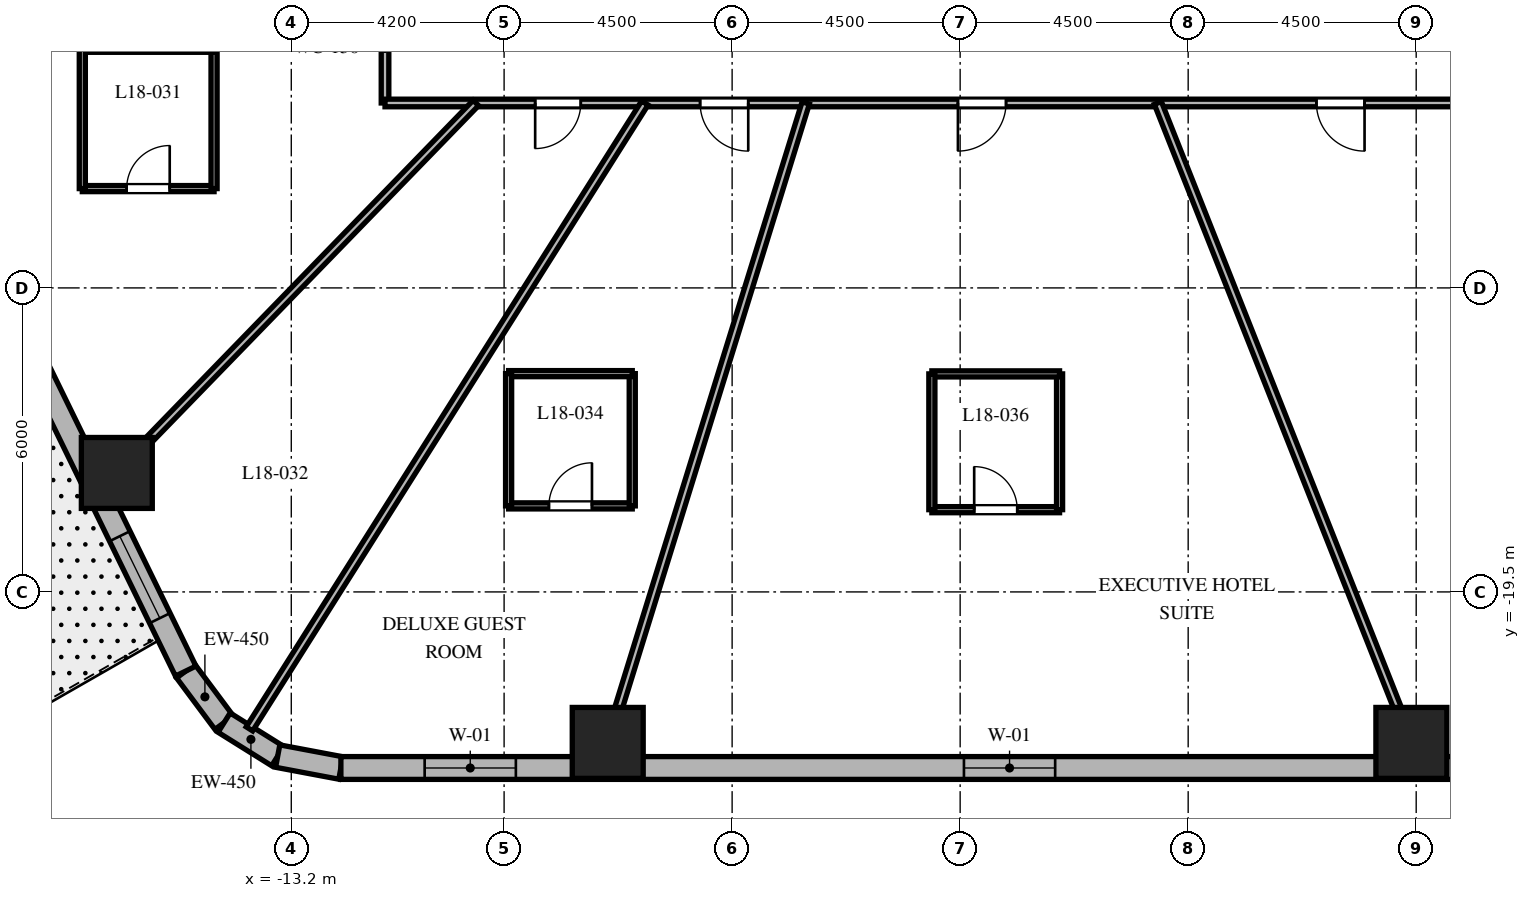
"""IFC4 building model, lengths in metres.
Left out: names, types, materials, properties, quantities, classifications, styles, units other than length and angle.
Written with IfcOpenShell. Run it as: python <this file> out.ifc"""

import sys

from ifc_helpers import new_model, si_unit, direction, frame, frame_2d, origin, origin_2d, place, context, subcontext, project, spatial, rectangle, extrude, element, fill, save


model = new_model("IFC4")
c1 = context("Model", 3, precision=1e-05, world=origin(), true_north=direction((0.0, 1.0)))
c2 = subcontext(c1, "Body", "Model", "MODEL_VIEW")
j1 = project(units=[si_unit("LENGTHUNIT", "METRE"), si_unit("PLANEANGLEUNIT", "RADIAN")], contexts=[c1])
p1 = place(None, origin())
s1 = spatial("IfcSite", under=j1, at=p1, CompositionType="ELEMENT")
p2 = place(p1, origin())
s2 = spatial("IfcBuilding", under=s1, at=p2, CompositionType="ELEMENT")
p3 = place(p2, frame((0.0, 0.0, 78.6)))
s3 = spatial("IfcBuildingStorey", under=s2, at=p3, CompositionType="ELEMENT", Elevation=78.6)
for number, where, z_axis, x_axis in (
    (1, (-6.955, -22.48, 0.0), (0.0, 0.0, 1.0), (1.0, 0.0, 0.0)),
    (2, (8.905, -22.48, 0.0), (0.0, 0.0, 1.0), (1.0, 0.0, 0.0)),
    (3, (-16.643, -17.152, 0.0), (0.0, 0.0, 1.0), (1.0, 0.0, 0.0)),
):
    element("IfcColumn", number, at=place(p3, frame(where, z_axis=z_axis, x_axis=x_axis)), inside=s3, PredefinedType="COLUMN", context=c2, shape_type="SweptSolid", body=[
        extrude(rectangle(XDim=1.4, YDim=1.4, at=origin_2d()), origin(), (0.0, 0.0, 1.0), 3.7),
    ])
p4 = place(p3, frame((-15.284, -21.062, 0.0), z_axis=(0.0, 0.0, 1.0), x_axis=(0.597595366449, -0.801797841104, 0.0)))
e4 = element("IfcWall", 4, at=p4, inside=s3, PredefinedType="SOLIDWALL", context=c2, shape_type="SweptSolid", body=[
    extrude(rectangle(XDim=1.269, YDim=0.45, at=frame_2d((0.634, 0.0))), origin(), (0.0, 0.0, 1.0), 3.4),
])
p5 = place(p3, frame((-14.526, -22.08, 0.0), z_axis=(0.0, 0.0, 1.0), x_axis=(0.848185203596, -0.529699783275, 0.0)))
e5 = element("IfcWall", 5, at=p5, inside=s3, PredefinedType="SOLIDWALL", context=c2, shape_type="SweptSolid", body=[
    extrude(rectangle(XDim=1.247, YDim=0.45, at=frame_2d((0.624, 0.0))), origin(), (0.0, 0.0, 1.0), 3.4),
])
p6 = place(p3, frame((-13.468, -22.74, 0.0), z_axis=(0.0, 0.0, 1.0), x_axis=(0.982717174228, -0.185113358451, 0.0)))
e6 = element("IfcWall", 6, at=p6, inside=s3, PredefinedType="SOLIDWALL", context=c2, shape_type="SweptSolid", body=[
    extrude(rectangle(XDim=1.269, YDim=0.45, at=frame_2d((0.634, 0.0))), origin(), (0.0, 0.0, 1.0), 3.4),
])
p7 = place(p3, frame((-12.221, -22.975, 0.0), z_axis=(0.0, 0.0, 1.0), x_axis=(1.0, 0.0, 0.0)))
e7 = element("IfcWall", 7, at=p7, inside=s3, PredefinedType="SOLIDWALL", context=c2, shape_type="SweptSolid", body=[
    extrude(rectangle(XDim=26.389, YDim=0.45, at=frame_2d((13.195, 0.0))), origin(), (0.0, 0.0, 1.0), 3.4),
])
p8 = place(p7, frame((1.653, 0.0, 0.8)))
e8 = element("IfcOpeningElement", 8, at=p8, cuts=e7, PredefinedType="OPENING", context=c2, shape_type="SweptSolid", body=[
    extrude(rectangle(XDim=1.8, YDim=1.8, at=frame_2d((0.9, 0.9))), frame((0.0, 0.235, 0.0), z_axis=(0.0, -1.0, 0.0), x_axis=(1.0, 0.0, 0.0)), (0.0, 0.0, 1.0), 0.47),
])
p9 = place(p7, frame((12.296, 0.0, 0.8)))
e9 = element("IfcOpeningElement", 9, at=p9, cuts=e7, PredefinedType="OPENING", context=c2, shape_type="SweptSolid", body=[
    extrude(rectangle(XDim=1.8, YDim=1.8, at=frame_2d((0.9, 0.9))), frame((0.0, 0.235, 0.0), z_axis=(0.0, -1.0, 0.0), x_axis=(1.0, 0.0, 0.0)), (0.0, 0.0, 1.0), 0.47),
])
p10 = place(p7, frame((22.938, 0.0, 0.8)))
e10 = element("IfcOpeningElement", 10, at=p10, cuts=e7, PredefinedType="OPENING", context=c2, shape_type="SweptSolid", body=[
    extrude(rectangle(XDim=1.8, YDim=1.8, at=frame_2d((0.9, 0.9))), frame((0.0, 0.235, 0.0), z_axis=(0.0, -1.0, 0.0), x_axis=(1.0, 0.0, 0.0)), (0.0, 0.0, 1.0), 0.47),
])
p11 = place(p3, frame((-24.336, -2.532, 0.0), z_axis=(0.0, 0.0, 1.0), x_axis=(0.438931326393, -0.898520612291, 0.0)))
e11 = element("IfcWall", 11, at=p11, inside=s3, PredefinedType="SOLIDWALL", context=c2, shape_type="SweptSolid", body=[
    extrude(rectangle(XDim=20.623, YDim=0.45, at=frame_2d((10.312, 0.0))), origin(), (0.0, 0.0, 1.0), 3.4),
])
p12 = place(p11, frame((5.171, 0.0, 0.0)))
e12 = element("IfcOpeningElement", 12, at=p12, cuts=e11, PredefinedType="OPENING", context=c2, shape_type="SweptSolid", body=[
    extrude(rectangle(XDim=0.95, YDim=2.15, at=frame_2d((0.475, 1.075))), frame((0.0, 0.235, 0.0), z_axis=(0.0, -1.0, 0.0), x_axis=(1.0, 0.0, 0.0)), (0.0, 0.0, 1.0), 0.47),
])
p13 = place(p11, frame((1.214, 0.0, 0.8)))
e13 = element("IfcOpeningElement", 13, at=p13, cuts=e11, PredefinedType="OPENING", context=c2, shape_type="SweptSolid", body=[
    extrude(rectangle(XDim=1.8, YDim=1.8, at=frame_2d((0.9, 0.9))), frame((0.0, 0.235, 0.0), z_axis=(0.0, -1.0, 0.0), x_axis=(1.0, 0.0, 0.0)), (0.0, 0.0, 1.0), 0.47),
])
p14 = place(p11, frame((9.462, 0.0, 0.8)))
e14 = element("IfcOpeningElement", 14, at=p14, cuts=e11, PredefinedType="OPENING", context=c2, shape_type="SweptSolid", body=[
    extrude(rectangle(XDim=1.8, YDim=1.8, at=frame_2d((0.9, 0.9))), frame((0.0, 0.235, 0.0), z_axis=(0.0, -1.0, 0.0), x_axis=(1.0, 0.0, 0.0)), (0.0, 0.0, 1.0), 0.47),
])
p15 = place(p11, frame((17.66, 0.0, 0.8)))
e15 = element("IfcOpeningElement", 15, at=p15, cuts=e11, PredefinedType="OPENING", context=c2, shape_type="SweptSolid", body=[
    extrude(rectangle(XDim=1.8, YDim=1.8, at=frame_2d((0.9, 0.9))), frame((0.0, 0.235, 0.0), z_axis=(0.0, -1.0, 0.0), x_axis=(1.0, 0.0, 0.0)), (0.0, 0.0, 1.0), 0.47),
])
p16 = place(p3, frame((-11.35, -9.85, 0.0), z_axis=(0.0, 0.0, 1.0), x_axis=(0.0, 1.0, 0.0)))
e16 = element("IfcWall", 16, at=p16, inside=s3, PredefinedType="PARTITIONING", context=c2, shape_type="SweptSolid", body=[
    extrude(rectangle(XDim=19.7, YDim=0.15, at=frame_2d((9.85, 0.0))), origin(), (0.0, 0.0, 1.0), 2.84),
])
p17 = place(p16, frame((17.206, 0.0, 0.0)))
e17 = element("IfcOpeningElement", 17, at=p17, cuts=e16, PredefinedType="OPENING", context=c2, shape_type="SweptSolid", body=[
    extrude(rectangle(XDim=0.9, YDim=2.03, at=frame_2d((0.45, 1.015))), frame((0.0, 0.085, 0.0), z_axis=(0.0, -1.0, 0.0), x_axis=(1.0, 0.0, 0.0)), (0.0, 0.0, 1.0), 0.17),
])
p18 = place(p16, frame((13.403, 0.0, 0.0)))
e18 = element("IfcOpeningElement", 18, at=p18, cuts=e16, PredefinedType="OPENING", context=c2, shape_type="SweptSolid", body=[
    extrude(rectangle(XDim=0.95, YDim=2.03, at=frame_2d((0.475, 1.015))), frame((0.0, 0.085, 0.0), z_axis=(0.0, -1.0, 0.0), x_axis=(1.0, 0.0, 0.0)), (0.0, 0.0, 1.0), 0.17),
])
p19 = place(p16, frame((10.134, 0.0, 0.0)))
e19 = element("IfcOpeningElement", 19, at=p19, cuts=e16, PredefinedType="OPENING", context=c2, shape_type="SweptSolid", body=[
    extrude(rectangle(XDim=0.95, YDim=2.03, at=frame_2d((0.475, 1.015))), frame((0.0, 0.085, 0.0), z_axis=(0.0, -1.0, 0.0), x_axis=(1.0, 0.0, 0.0)), (0.0, 0.0, 1.0), 0.17),
])
p20 = place(p16, frame((7.571, 0.0, 0.0)))
e20 = element("IfcOpeningElement", 20, at=p20, cuts=e16, PredefinedType="OPENING", context=c2, shape_type="SweptSolid", body=[
    extrude(rectangle(XDim=0.95, YDim=2.03, at=frame_2d((0.475, 1.015))), frame((0.0, 0.085, 0.0), z_axis=(0.0, -1.0, 0.0), x_axis=(1.0, 0.0, 0.0)), (0.0, 0.0, 1.0), 0.17),
])
p21 = place(p16, frame((3.024, 0.0, 0.0)))
e21 = element("IfcOpeningElement", 21, at=p21, cuts=e16, PredefinedType="OPENING", context=c2, shape_type="SweptSolid", body=[
    extrude(rectangle(XDim=0.95, YDim=2.03, at=frame_2d((0.475, 1.015))), frame((0.0, 0.085, 0.0), z_axis=(0.0, -1.0, 0.0), x_axis=(1.0, 0.0, 0.0)), (0.0, 0.0, 1.0), 0.17),
])
p22 = place(p3, frame((11.35, -9.85, 0.0), z_axis=(0.0, 0.0, 1.0), x_axis=(-1.0, 0.0, 0.0)))
e22 = element("IfcWall", 22, at=p22, inside=s3, PredefinedType="PARTITIONING", context=c2, shape_type="SweptSolid", body=[
    extrude(rectangle(XDim=22.7, YDim=0.15, at=frame_2d((11.35, 0.0))), origin(), (0.0, 0.0, 1.0), 2.84),
])
p23 = place(p22, frame((18.837, 0.0, 0.0)))
e23 = element("IfcOpeningElement", 23, at=p23, cuts=e22, PredefinedType="OPENING", context=c2, shape_type="SweptSolid", body=[
    extrude(rectangle(XDim=0.9, YDim=2.03, at=frame_2d((0.45, 1.015))), frame((0.0, 0.085, 0.0), z_axis=(0.0, -1.0, 0.0), x_axis=(1.0, 0.0, 0.0)), (0.0, 0.0, 1.0), 0.17),
])
p24 = place(p22, frame((15.532, 0.0, 0.0)))
e24 = element("IfcOpeningElement", 24, at=p24, cuts=e22, PredefinedType="OPENING", context=c2, shape_type="SweptSolid", body=[
    extrude(rectangle(XDim=0.95, YDim=2.03, at=frame_2d((0.475, 1.015))), frame((0.0, 0.085, 0.0), z_axis=(0.0, -1.0, 0.0), x_axis=(1.0, 0.0, 0.0)), (0.0, 0.0, 1.0), 0.17),
])
p25 = place(p22, frame((10.444, 0.0, 0.0)))
e25 = element("IfcOpeningElement", 25, at=p25, cuts=e22, PredefinedType="OPENING", context=c2, shape_type="SweptSolid", body=[
    extrude(rectangle(XDim=0.95, YDim=2.03, at=frame_2d((0.475, 1.015))), frame((0.0, 0.085, 0.0), z_axis=(0.0, -1.0, 0.0), x_axis=(1.0, 0.0, 0.0)), (0.0, 0.0, 1.0), 0.17),
])
p26 = place(p22, frame((3.369, 0.0, 0.0)))
e26 = element("IfcOpeningElement", 26, at=p26, cuts=e22, PredefinedType="OPENING", context=c2, shape_type="SweptSolid", body=[
    extrude(rectangle(XDim=0.95, YDim=2.03, at=frame_2d((0.475, 1.015))), frame((0.0, 0.085, 0.0), z_axis=(0.0, -1.0, 0.0), x_axis=(1.0, 0.0, 0.0)), (0.0, 0.0, 1.0), 0.17),
])
p27 = place(p3, frame((-9.558, -9.85, 0.0), z_axis=(0.0, 0.0, 1.0), x_axis=(-0.69638346089, -0.717669893056, 0.0)))
e27 = element("IfcWall", 27, at=p27, inside=s3, PredefinedType="PARTITIONING", context=c2, shape_type="SweptSolid", body=[
    extrude(rectangle(XDim=10.701, YDim=0.15, at=frame_2d((5.351, 0.0))), origin(), (0.0, 0.0, 1.0), 2.54),
])
p28 = place(p3, frame((-6.222, -9.85, 0.0), z_axis=(0.0, 0.0, 1.0), x_axis=(-0.534069056435, -0.845440857162, 0.0)))
e28 = element("IfcWall", 28, at=p28, inside=s3, PredefinedType="PARTITIONING", context=c2, shape_type="SweptSolid", body=[
    extrude(rectangle(XDim=14.611, YDim=0.15, at=frame_2d((7.306, 0.0))), origin(), (0.0, 0.0, 1.0), 2.54),
])
p29 = place(p3, frame((-3.048, -9.85, 0.0), z_axis=(0.0, 0.0, 1.0), x_axis=(-0.295553992761, -0.955326037206, 0.0)))
e29 = element("IfcWall", 29, at=p29, inside=s3, PredefinedType="PARTITIONING", context=c2, shape_type="SweptSolid", body=[
    extrude(rectangle(XDim=13.739, YDim=0.15, at=frame_2d((6.869, 0.0))), origin(), (0.0, 0.0, 1.0), 2.54),
])
p30 = place(p3, frame((3.902, -9.85, 0.0), z_axis=(0.0, 0.0, 1.0), x_axis=(0.36828765711, -0.929711891728, 0.0)))
e30 = element("IfcWall", 30, at=p30, inside=s3, PredefinedType="PARTITIONING", context=c2, shape_type="SweptSolid", body=[
    extrude(rectangle(XDim=14.117, YDim=0.15, at=frame_2d((7.059, 0.0))), origin(), (0.0, 0.0, 1.0), 2.54),
])
p31 = place(p3, frame((-17.324, -11.54, 0.0), z_axis=(0.0, 0.0, 1.0), x_axis=(1.0, 0.0, 0.0)))
e31 = element("IfcWall", 31, at=p31, inside=s3, PredefinedType="PARTITIONING", context=c2, shape_type="SweptSolid", body=[
    extrude(rectangle(XDim=2.6, YDim=0.12, at=frame_2d((1.3, 0.0))), origin(), (0.0, 0.0, 1.0), 2.927),
])
p32 = place(p31, frame((0.875, 0.0, 0.0)))
e32 = element("IfcOpeningElement", 32, at=p32, cuts=e31, PredefinedType="OPENING", context=c2, shape_type="SweptSolid", body=[
    extrude(rectangle(XDim=0.85, YDim=2.03, at=frame_2d((0.425, 1.015))), frame((0.0, 0.07, 0.0), z_axis=(0.0, -1.0, 0.0), x_axis=(1.0, 0.0, 0.0)), (0.0, 0.0, 1.0), 0.14),
])
for number, where, z_axis, x_axis in (
    (33, (-14.724, -11.54, 0.0), (0.0, 0.0, 1.0), (0.0, 1.0, 0.0)),
    (34, (-17.324, -8.79, 0.0), (0.0, 0.0, 1.0), (0.0, -1.0, 0.0)),
):
    element("IfcWall", number, at=place(p3, frame(where, z_axis=z_axis, x_axis=x_axis)), inside=s3, PredefinedType="PARTITIONING", context=c2, shape_type="SweptSolid", body=[
        extrude(rectangle(XDim=2.75, YDim=0.12, at=frame_2d((1.375, 0.0))), origin(), (0.0, 0.0, 1.0), 3.4),
    ])
p33 = place(p3, frame((-8.911, -17.802, 0.0), z_axis=(0.0, 0.0, 1.0), x_axis=(1.0, 0.0, 0.0)))
e35 = element("IfcWall", 35, at=p33, inside=s3, PredefinedType="PARTITIONING", context=c2, shape_type="SweptSolid", body=[
    extrude(rectangle(XDim=2.44, YDim=0.12, at=frame_2d((1.22, 0.0))), origin(), (0.0, 0.0, 1.0), 2.84),
])
p34 = place(p33, frame((0.795, 0.0, 0.0)))
e36 = element("IfcOpeningElement", 36, at=p34, cuts=e35, PredefinedType="OPENING", context=c2, shape_type="SweptSolid", body=[
    extrude(rectangle(XDim=0.85, YDim=2.03, at=frame_2d((0.425, 1.015))), frame((0.0, 0.07, 0.0), z_axis=(0.0, -1.0, 0.0), x_axis=(1.0, 0.0, 0.0)), (0.0, 0.0, 1.0), 0.14),
])
p35 = place(p3, frame((-6.471, -17.802, 0.0), z_axis=(0.0, 0.0, 1.0), x_axis=(0.0, 1.0, 0.0)))
e37 = element("IfcWall", 37, at=p35, inside=s3, PredefinedType="PARTITIONING", context=c2, shape_type="SweptSolid", body=[
    extrude(rectangle(XDim=2.61, YDim=0.12, at=frame_2d((1.305, 0.0))), origin(), (0.0, 0.0, 1.0), 2.84),
])
p36 = place(p3, frame((-6.471, -15.192, 0.0), z_axis=(0.0, 0.0, 1.0), x_axis=(-1.0, 0.0, 0.0)))
e38 = element("IfcWall", 38, at=p36, inside=s3, PredefinedType="PARTITIONING", context=c2, shape_type="SweptSolid", body=[
    extrude(rectangle(XDim=2.44, YDim=0.12, at=frame_2d((1.22, 0.0))), origin(), (0.0, 0.0, 1.0), 2.84),
])
p37 = place(p3, frame((-8.911, -15.192, 0.0), z_axis=(0.0, 0.0, 1.0), x_axis=(0.0, -1.0, 0.0)))
e39 = element("IfcWall", 39, at=p37, inside=s3, PredefinedType="PARTITIONING", context=c2, shape_type="SweptSolid", body=[
    extrude(rectangle(XDim=2.61, YDim=0.12, at=frame_2d((1.305, 0.0))), origin(), (0.0, 0.0, 1.0), 2.972),
])
p38 = place(p3, frame((-0.558, -17.877, 0.0), z_axis=(0.0, 0.0, 1.0), x_axis=(1.0, 0.0, 0.0)))
e40 = element("IfcWall", 40, at=p38, inside=s3, PredefinedType="PARTITIONING", context=c2, shape_type="SweptSolid", body=[
    extrude(rectangle(XDim=2.52, YDim=0.12, at=frame_2d((1.26, 0.0))), origin(), (0.0, 0.0, 1.0), 2.84),
])
p39 = place(p38, frame((0.835, 0.0, 0.0)))
e41 = element("IfcOpeningElement", 41, at=p39, cuts=e40, PredefinedType="OPENING", context=c2, shape_type="SweptSolid", body=[
    extrude(rectangle(XDim=0.85, YDim=2.03, at=frame_2d((0.425, 1.015))), frame((0.0, 0.07, 0.0), z_axis=(0.0, -1.0, 0.0), x_axis=(1.0, 0.0, 0.0)), (0.0, 0.0, 1.0), 0.14),
])
p40 = place(p3, frame((1.962, -17.877, 0.0), z_axis=(0.0, 0.0, 1.0), x_axis=(0.0, 1.0, 0.0)))
e42 = element("IfcWall", 42, at=p40, inside=s3, PredefinedType="PARTITIONING", context=c2, shape_type="SweptSolid", body=[
    extrude(rectangle(XDim=2.68, YDim=0.12, at=frame_2d((1.34, 0.0))), origin(), (0.0, 0.0, 1.0), 2.84),
])
p41 = place(p3, frame((1.962, -15.197, 0.0), z_axis=(0.0, 0.0, 1.0), x_axis=(-1.0, 0.0, 0.0)))
e43 = element("IfcWall", 43, at=p41, inside=s3, PredefinedType="PARTITIONING", context=c2, shape_type="SweptSolid", body=[
    extrude(rectangle(XDim=2.52, YDim=0.12, at=frame_2d((1.26, 0.0))), origin(), (0.0, 0.0, 1.0), 3.4),
])
p42 = place(p3, frame((-0.558, -15.197, 0.0), z_axis=(0.0, 0.0, 1.0), x_axis=(0.0, -1.0, 0.0)))
e44 = element("IfcWall", 44, at=p42, inside=s3, PredefinedType="PARTITIONING", context=c2, shape_type="SweptSolid", body=[
    extrude(rectangle(XDim=2.68, YDim=0.12, at=frame_2d((1.34, 0.0))), origin(), (0.0, 0.0, 1.0), 2.84),
])
p43 = place(p8, origin())
e45 = element("IfcWindow", 45, at=p43, inside=s3, PartitioningType="SINGLE_PANEL", PredefinedType="WINDOW", context=c2, shape_type="SweptSolid", body=[
    extrude(rectangle(XDim=1.8, YDim=1.8, at=frame_2d((0.9, 0.9))), frame((0.0, 0.03, 0.0), z_axis=(0.0, -1.0, 0.0), x_axis=(1.0, 0.0, 0.0)), (0.0, 0.0, 1.0), 0.06),
])
fill(e8, e45)
p44 = place(p9, origin())
e46 = element("IfcWindow", 46, at=p44, inside=s3, PartitioningType="SINGLE_PANEL", PredefinedType="WINDOW", context=c2, shape_type="SweptSolid", body=[
    extrude(rectangle(XDim=1.8, YDim=1.8, at=frame_2d((0.9, 0.9))), frame((0.0, 0.03, 0.0), z_axis=(0.0, -1.0, 0.0), x_axis=(1.0, 0.0, 0.0)), (0.0, 0.0, 1.0), 0.06),
])
fill(e9, e46)
p45 = place(p15, origin())
e47 = element("IfcWindow", 47, at=p45, inside=s3, PartitioningType="SINGLE_PANEL", PredefinedType="WINDOW", context=c2, shape_type="SweptSolid", body=[
    extrude(rectangle(XDim=1.8, YDim=1.8, at=frame_2d((0.9, 0.9))), frame((0.0, 0.03, 0.0), z_axis=(0.0, -1.0, 0.0), x_axis=(1.0, 0.0, 0.0)), (0.0, 0.0, 1.0), 0.06),
])
fill(e15, e47)
p46 = place(p32, origin())
e48 = element("IfcDoor", 48, at=p46, inside=s3, OperationType="SINGLE_SWING_RIGHT", PredefinedType="DOOR", context=c2, shape_type="SweptSolid", body=[
    extrude(rectangle(XDim=0.85, YDim=2.03, at=frame_2d((0.425, 1.015))), frame((0.0, 0.025, 0.0), z_axis=(0.0, -1.0, 0.0), x_axis=(1.0, 0.0, 0.0)), (0.0, 0.0, 1.0), 0.05),
])
fill(e32, e48)
p47 = place(p23, origin())
e49 = element("IfcDoor", 49, at=p47, inside=s3, OperationType="SINGLE_SWING_RIGHT", PredefinedType="DOOR", context=c2, shape_type="SweptSolid", body=[
    extrude(rectangle(XDim=0.9, YDim=2.03, at=frame_2d((0.45, 1.015))), frame((0.0, 0.025, 0.0), z_axis=(0.0, -1.0, 0.0), x_axis=(1.0, 0.0, 0.0)), (0.0, 0.0, 1.0), 0.05),
])
fill(e23, e49)
p48 = place(p24, origin())
e50 = element("IfcDoor", 50, at=p48, inside=s3, OperationType="SINGLE_SWING_LEFT", PredefinedType="DOOR", context=c2, shape_type="SweptSolid", body=[
    extrude(rectangle(XDim=0.95, YDim=2.03, at=frame_2d((0.475, 1.015))), frame((0.0, 0.025, 0.0), z_axis=(0.0, -1.0, 0.0), x_axis=(1.0, 0.0, 0.0)), (0.0, 0.0, 1.0), 0.05),
])
fill(e24, e50)
p49 = place(p34, origin())
e51 = element("IfcDoor", 51, at=p49, inside=s3, OperationType="SINGLE_SWING_RIGHT", PredefinedType="DOOR", context=c2, shape_type="SweptSolid", body=[
    extrude(rectangle(XDim=0.85, YDim=2.03, at=frame_2d((0.425, 1.015))), frame((0.0, 0.025, 0.0), z_axis=(0.0, -1.0, 0.0), x_axis=(1.0, 0.0, 0.0)), (0.0, 0.0, 1.0), 0.05),
])
fill(e36, e51)
p50 = place(p25, origin())
e52 = element("IfcDoor", 52, at=p50, inside=s3, OperationType="SINGLE_SWING_RIGHT", PredefinedType="DOOR", context=c2, shape_type="SweptSolid", body=[
    extrude(rectangle(XDim=0.95, YDim=2.03, at=frame_2d((0.475, 1.015))), frame((0.0, 0.025, 0.0), z_axis=(0.0, -1.0, 0.0), x_axis=(1.0, 0.0, 0.0)), (0.0, 0.0, 1.0), 0.05),
])
fill(e25, e52)
p51 = place(p39, origin())
e53 = element("IfcDoor", 53, at=p51, inside=s3, OperationType="SINGLE_SWING_LEFT", PredefinedType="DOOR", context=c2, shape_type="SweptSolid", body=[
    extrude(rectangle(XDim=0.85, YDim=2.03, at=frame_2d((0.425, 1.015))), frame((0.0, 0.025, 0.0), z_axis=(0.0, -1.0, 0.0), x_axis=(1.0, 0.0, 0.0)), (0.0, 0.0, 1.0), 0.05),
])
fill(e41, e53)
p52 = place(p26, origin())
e54 = element("IfcDoor", 54, at=p52, inside=s3, OperationType="SINGLE_SWING_LEFT", PredefinedType="DOOR", context=c2, shape_type="SweptSolid", body=[
    extrude(rectangle(XDim=0.95, YDim=2.03, at=frame_2d((0.475, 1.015))), frame((0.0, 0.025, 0.0), z_axis=(0.0, -1.0, 0.0), x_axis=(1.0, 0.0, 0.0)), (0.0, 0.0, 1.0), 0.05),
])
fill(e26, e54)
save(model, sys.argv[1])
